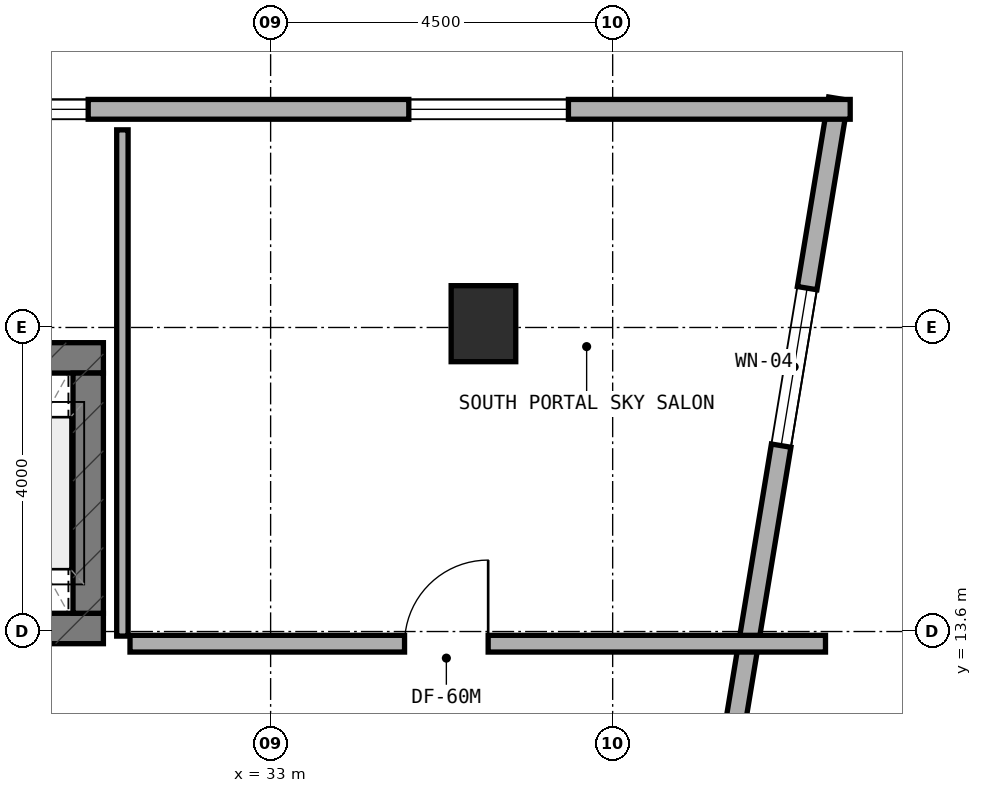
"""IFC4 building model, lengths in metres.
Left out: names, types, materials, properties, quantities, classifications, styles, units other than length and angle.
Written with IfcOpenShell. Run it as: python <this file> out.ifc"""

import sys

from ifc_helpers import new_model, si_unit, direction, frame, frame_2d, origin, origin_2d, place, context, subcontext, project, spatial, rectangle, extrude, element, fill, save


model = new_model("IFC4")
c1 = context("Model", 3, precision=1e-05, world=origin(), true_north=direction((0.0, 1.0)))
c2 = subcontext(c1, "Body", "Model", "MODEL_VIEW")
j1 = project(units=[si_unit("LENGTHUNIT", "METRE"), si_unit("PLANEANGLEUNIT", "RADIAN")], contexts=[c1])
p1 = place(None, origin())
s1 = spatial("IfcSite", under=j1, at=p1, CompositionType="ELEMENT")
p2 = place(p1, origin())
s2 = spatial("IfcBuilding", under=s1, at=p2, CompositionType="ELEMENT")
p3 = place(p2, frame((0.0, 0.0, 191.9)))
s3 = spatial("IfcBuildingStorey", under=s2, at=p3, CompositionType="ELEMENT", Elevation=191.9)
p4 = place(p3, frame((6.4, 13.64, 0.0), z_axis=(0.0, 0.0, 1.0), x_axis=(1.0, 0.0, 0.0)))
e1 = element("IfcWall", 1, at=p4, inside=s3, PredefinedType="SHEAR", context=c2, shape_type="SweptSolid", body=[
    extrude(rectangle(XDim=24.4, YDim=0.4, at=frame_2d((12.2, 0.0))), origin(), (0.0, 0.0, 1.0), 3.6),
])
p5 = place(p4, frame((9.15, 0.0, 0.0)))
e2 = element("IfcOpeningElement", 2, at=p5, cuts=e1, PredefinedType="OPENING", context=c2, shape_type="SweptSolid", body=[
    extrude(rectangle(XDim=1.2, YDim=2.15, at=frame_2d((0.6, 1.075))), frame((0.0, 0.21, 0.0), z_axis=(0.0, -1.0, 0.0), x_axis=(1.0, 0.0, 0.0)), (0.0, 0.0, 1.0), 0.42),
])
p6 = place(p4, frame((16.94, 0.0, 0.0)))
e3 = element("IfcOpeningElement", 3, at=p6, cuts=e1, PredefinedType="OPENING", context=c2, shape_type="SweptSolid", body=[
    extrude(rectangle(XDim=0.85, YDim=2.1, at=frame_2d((0.425, 1.05))), frame((0.0, 0.21, 0.0), z_axis=(0.0, -1.0, 0.0), x_axis=(1.0, 0.0, 0.0)), (0.0, 0.0, 1.0), 0.42),
])
p7 = place(p4, frame((18.783, 0.0, 0.0)))
e4 = element("IfcOpeningElement", 4, at=p7, cuts=e1, PredefinedType="OPENING", context=c2, shape_type="SweptSolid", body=[
    extrude(rectangle(XDim=1.1, YDim=2.15, at=frame_2d((0.55, 1.075))), frame((0.0, 0.21, 0.0), z_axis=(0.0, -1.0, 0.0), x_axis=(1.0, 0.0, 0.0)), (0.0, 0.0, 1.0), 0.42),
])
p8 = place(p4, frame((20.65, 0.0, 0.0)))
e5 = element("IfcOpeningElement", 5, at=p8, cuts=e1, PredefinedType="OPENING", context=c2, shape_type="SweptSolid", body=[
    extrude(rectangle(XDim=1.1, YDim=2.15, at=frame_2d((0.55, 1.075))), frame((0.0, 0.21, 0.0), z_axis=(0.0, -1.0, 0.0), x_axis=(1.0, 0.0, 0.0)), (0.0, 0.0, 1.0), 0.42),
])
p9 = place(p4, frame((22.517, 0.0, 0.0)))
e6 = element("IfcOpeningElement", 6, at=p9, cuts=e1, PredefinedType="OPENING", context=c2, shape_type="SweptSolid", body=[
    extrude(rectangle(XDim=1.1, YDim=2.15, at=frame_2d((0.55, 1.075))), frame((0.0, 0.21, 0.0), z_axis=(0.0, -1.0, 0.0), x_axis=(1.0, 0.0, 0.0)), (0.0, 0.0, 1.0), 0.42),
])
p10 = place(p3, frame((6.4, 17.2, 0.0), z_axis=(0.0, 0.0, 1.0), x_axis=(1.0, 0.0, 0.0)))
e7 = element("IfcWall", 7, at=p10, inside=s3, PredefinedType="SHEAR", context=c2, shape_type="SweptSolid", body=[
    extrude(rectangle(XDim=24.4, YDim=0.4, at=frame_2d((12.2, 0.0))), origin(), (0.0, 0.0, 1.0), 3.6),
])
p11 = place(p3, frame((30.6, 13.84, 0.0), z_axis=(0.0, 0.0, 1.0), x_axis=(0.0, 1.0, 0.0)))
e8 = element("IfcWall", 8, at=p11, inside=s3, PredefinedType="SHEAR", context=c2, shape_type="SweptSolid", body=[
    extrude(rectangle(XDim=3.16, YDim=0.4, at=frame_2d((1.58, 0.0))), origin(), (0.0, 0.0, 1.0), 3.6),
])
p12 = place(p3, frame((35.8, 17.65, 0.0), z_axis=(0.0, 0.0, 1.0), x_axis=(1.0, 0.0, 0.0)))
e9 = element("IfcColumn", 9, at=p12, inside=s3, PredefinedType="COLUMN", context=c2, shape_type="SweptSolid", body=[
    extrude(rectangle(XDim=0.85, YDim=1.0, at=origin_2d()), origin(), (0.0, 0.0, 1.0), 3.6),
])
p13 = place(p3, frame((38.771, 10.313, 0.0), z_axis=(0.0, 0.0, 1.0), x_axis=(0.16277908586, 0.986662540693, 0.0)))
e10 = element("IfcWall", 10, at=p13, inside=s3, PredefinedType="STANDARD", context=c2, shape_type="SweptSolid", body=[
    extrude(rectangle(XDim=10.437, YDim=0.26, at=frame_2d((5.219, 0.0))), origin(), (0.0, 0.0, 1.0), 3.32),
])
p14 = place(p13, frame((5.81, 0.0, 0.85)))
e11 = element("IfcOpeningElement", 11, at=p14, cuts=e10, PredefinedType="OPENING", context=c2, shape_type="SweptSolid", body=[
    extrude(rectangle(XDim=2.1, YDim=1.5, at=frame_2d((1.05, 0.75))), frame((0.0, 0.14, 0.0), z_axis=(0.0, -1.0, 0.0), x_axis=(1.0, 0.0, 0.0)), (0.0, 0.0, 1.0), 0.28),
])
p15 = place(p3, frame((40.625, 20.47, 0.0), z_axis=(0.0, 0.0, 1.0), x_axis=(-1.0, 0.0, 0.0)))
e12 = element("IfcWall", 12, at=p15, inside=s3, PredefinedType="STANDARD", context=c2, shape_type="SweptSolid", body=[
    extrude(rectangle(XDim=12.215, YDim=0.26, at=frame_2d((6.107, 0.0))), origin(), (0.0, 0.0, 1.0), 2.995),
])
p16 = place(p15, frame((3.707, 0.0, 0.85)))
e13 = element("IfcOpeningElement", 13, at=p16, cuts=e12, PredefinedType="OPENING", context=c2, shape_type="SweptSolid", body=[
    extrude(rectangle(XDim=2.1, YDim=1.5, at=frame_2d((1.05, 0.75))), frame((0.0, 0.14, 0.0), z_axis=(0.0, -1.0, 0.0), x_axis=(1.0, 0.0, 0.0)), (0.0, 0.0, 1.0), 0.28),
])
p17 = place(p15, frame((10.025, 0.0, 0.85)))
e14 = element("IfcOpeningElement", 14, at=p17, cuts=e12, PredefinedType="OPENING", context=c2, shape_type="SweptSolid", body=[
    extrude(rectangle(XDim=1.8, YDim=1.5, at=frame_2d((0.9, 0.75))), frame((0.0, 0.14, 0.0), z_axis=(0.0, -1.0, 0.0), x_axis=(1.0, 0.0, 0.0)), (0.0, 0.0, 1.0), 0.28),
])
p18 = place(p3, frame((31.05, 13.54, 0.0), z_axis=(0.0, 0.0, 1.0), x_axis=(0.0, 1.0, 0.0)))
e15 = element("IfcWall", 15, at=p18, inside=s3, PredefinedType="PARTITIONING", context=c2, shape_type="SweptSolid", body=[
    extrude(rectangle(XDim=6.66, YDim=0.15, at=frame_2d((3.33, 0.0))), origin(), (0.0, 0.0, 1.0), 2.995),
])
p19 = place(p3, frame((31.15, 13.44, 0.0), z_axis=(0.0, 0.0, 1.0), x_axis=(1.0, 0.0, 0.0)))
e16 = element("IfcWall", 16, at=p19, inside=s3, PredefinedType="SOLIDWALL", context=c2, shape_type="SweptSolid", body=[
    extrude(rectangle(XDim=9.15, YDim=0.22, at=frame_2d((4.575, 0.0))), origin(), (0.0, 0.0, 1.0), 2.935),
])
p20 = place(p19, frame((3.612, 0.0, 0.0)))
e17 = element("IfcOpeningElement", 17, at=p20, cuts=e16, PredefinedType="OPENING", context=c2, shape_type="SweptSolid", body=[
    extrude(rectangle(XDim=1.1, YDim=2.1, at=frame_2d((0.55, 1.05))), frame((0.0, 0.12, 0.0), z_axis=(0.0, -1.0, 0.0), x_axis=(1.0, 0.0, 0.0)), (0.0, 0.0, 1.0), 0.24),
])
p21 = place(p14, origin())
e18 = element("IfcWindow", 18, at=p21, inside=s3, PartitioningType="SINGLE_PANEL", PredefinedType="WINDOW", context=c2, shape_type="SweptSolid", body=[
    extrude(rectangle(XDim=2.1, YDim=1.5, at=frame_2d((1.05, 0.75))), frame((0.0, 0.03, 0.0), z_axis=(0.0, -1.0, 0.0), x_axis=(1.0, 0.0, 0.0)), (0.0, 0.0, 1.0), 0.06),
])
fill(e11, e18)
p22 = place(p16, origin())
e19 = element("IfcWindow", 19, at=p22, inside=s3, PartitioningType="SINGLE_PANEL", PredefinedType="WINDOW", context=c2, shape_type="SweptSolid", body=[
    extrude(rectangle(XDim=2.1, YDim=1.5, at=frame_2d((1.05, 0.75))), frame((0.0, 0.03, 0.0), z_axis=(0.0, -1.0, 0.0), x_axis=(1.0, 0.0, 0.0)), (0.0, 0.0, 1.0), 0.06),
])
fill(e13, e19)
p23 = place(p17, origin())
e20 = element("IfcWindow", 20, at=p23, inside=s3, PartitioningType="SINGLE_PANEL", PredefinedType="WINDOW", context=c2, shape_type="SweptSolid", body=[
    extrude(rectangle(XDim=1.8, YDim=1.5, at=frame_2d((0.9, 0.75))), frame((0.0, 0.03, 0.0), z_axis=(0.0, -1.0, 0.0), x_axis=(1.0, 0.0, 0.0)), (0.0, 0.0, 1.0), 0.06),
])
fill(e14, e20)
p24 = place(p20, origin())
e21 = element("IfcDoor", 21, at=p24, inside=s3, OperationType="SINGLE_SWING_RIGHT", PredefinedType="DOOR", context=c2, shape_type="SweptSolid", body=[
    extrude(rectangle(XDim=1.1, YDim=2.1, at=frame_2d((0.55, 1.05))), frame((0.0, 0.025, 0.0), z_axis=(0.0, -1.0, 0.0), x_axis=(1.0, 0.0, 0.0)), (0.0, 0.0, 1.0), 0.05),
])
fill(e17, e21)
save(model, sys.argv[1])
